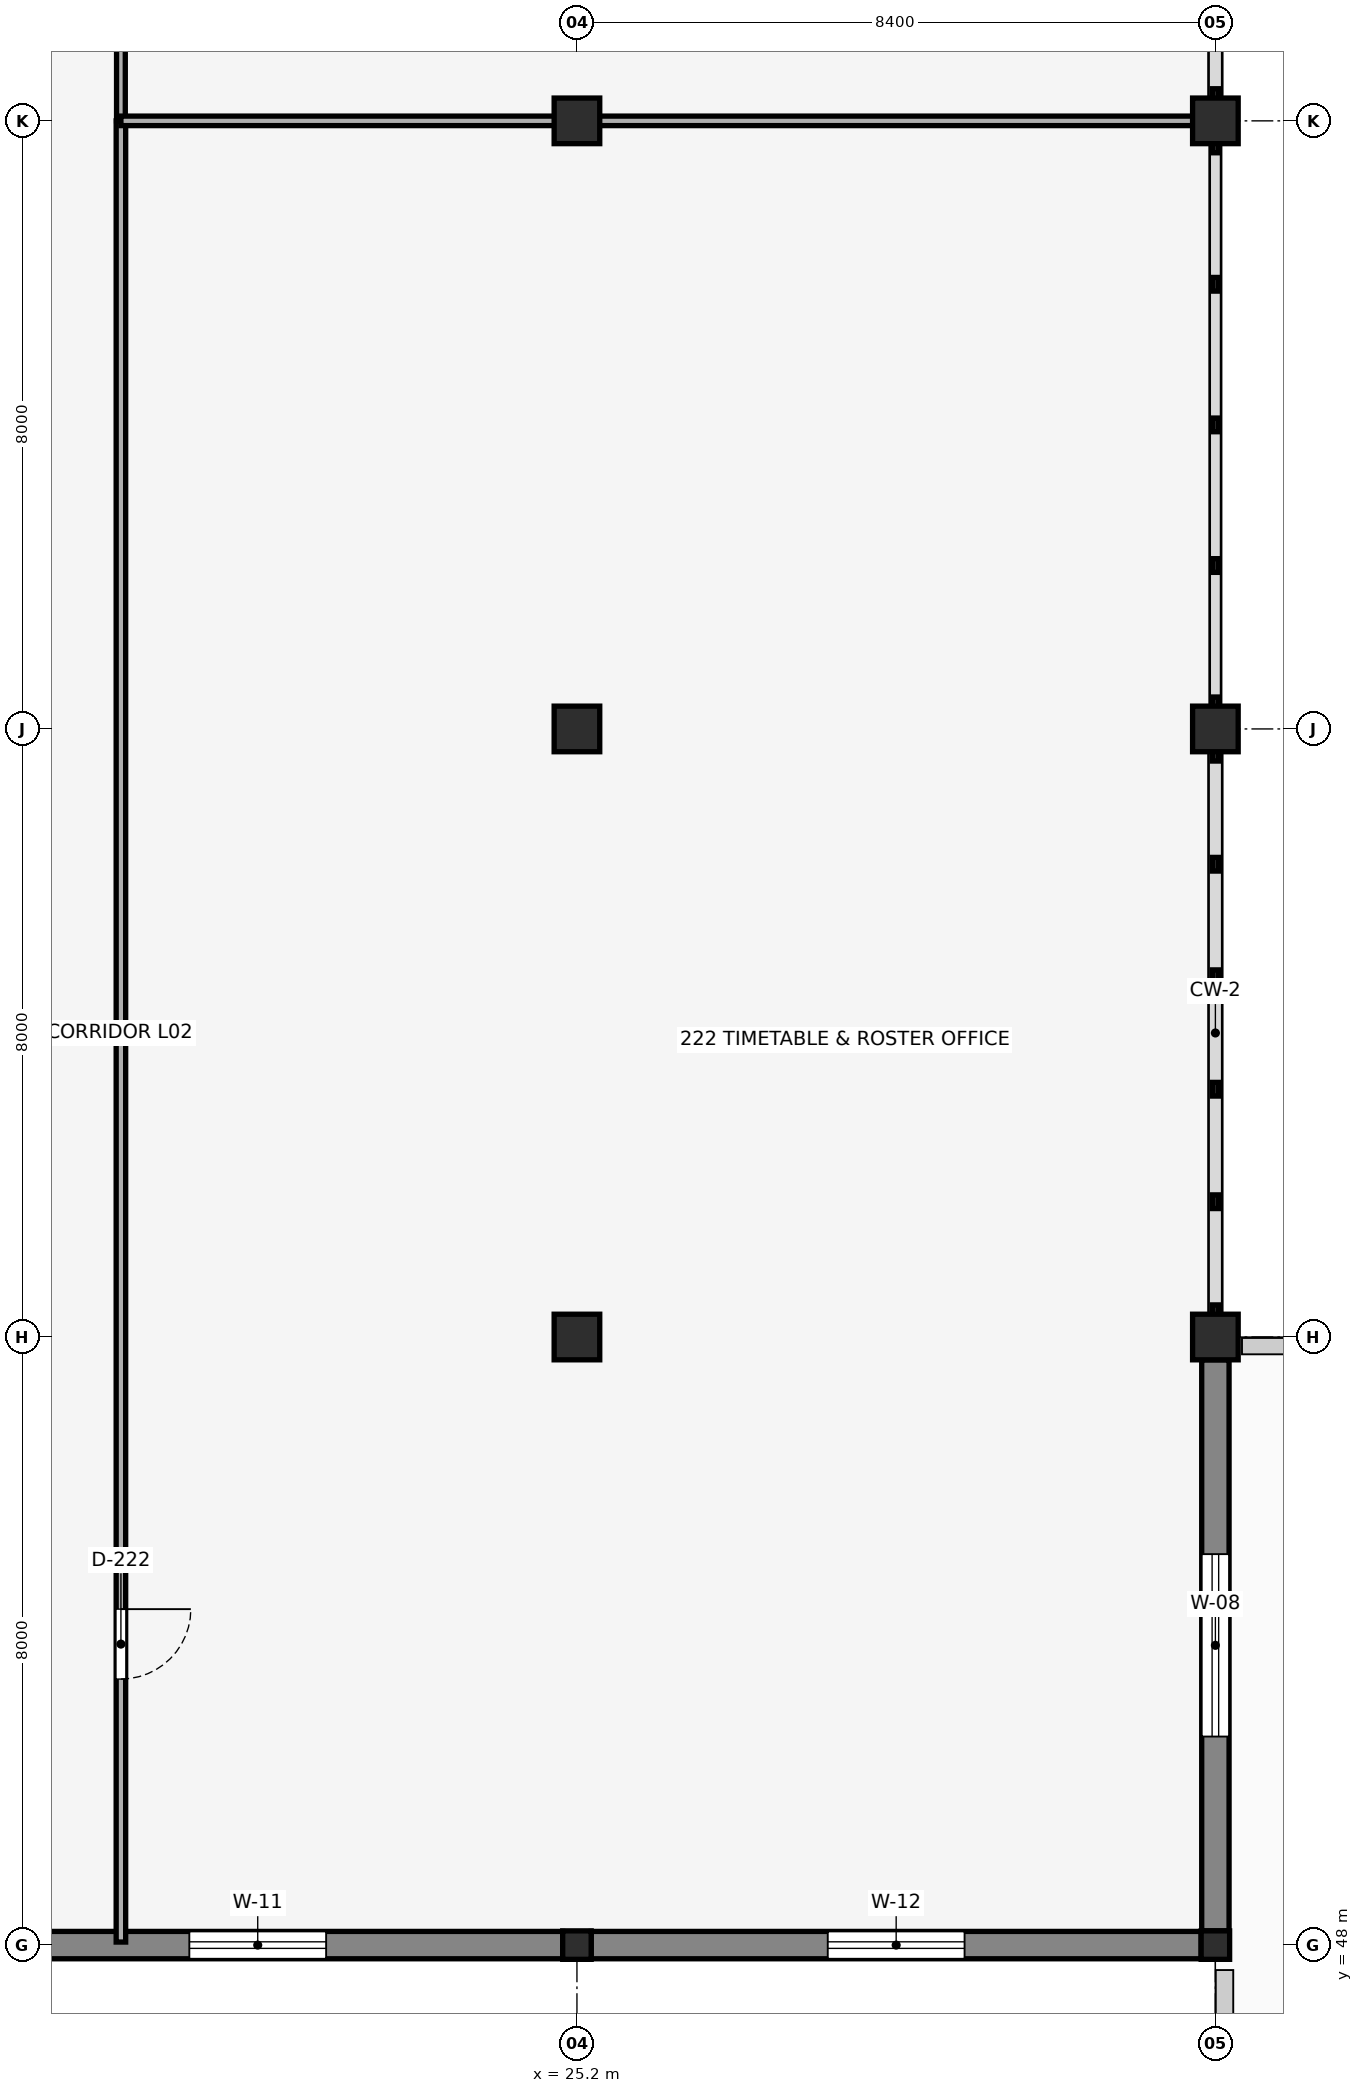
"""IFC4 building model, lengths in metres.
Left out: names, types, materials, properties, quantities, classifications, styles, units other than length and angle.
Written with IfcOpenShell. Run it as: python <this file> out.ifc"""

import sys

from ifc_helpers import new_model, si_unit, direction, frame, frame_2d, origin, origin_2d, place, context, subcontext, project, spatial, rectangle, i_section, extrude, element, fill, save


model = new_model("IFC4")
c1 = context("Model", 3, precision=1e-05, world=origin(), true_north=direction((0.0, 1.0)))
c2 = subcontext(c1, "Body", "Model", "MODEL_VIEW")
j1 = project(units=[si_unit("LENGTHUNIT", "METRE"), si_unit("PLANEANGLEUNIT", "RADIAN")], contexts=[c1])
p1 = place(None, origin())
s1 = spatial("IfcSite", under=j1, at=p1, CompositionType="ELEMENT")
p2 = place(p1, origin())
s2 = spatial("IfcBuilding", under=s1, at=p2, CompositionType="ELEMENT")
p3 = place(p2, frame((0.0, 0.0, 9.52)))
s3 = spatial("IfcBuildingStorey", under=s2, at=p3, CompositionType="ELEMENT", Elevation=9.52)
p4 = place(p3, frame((25.2, 48.0, 0.0), z_axis=(0.0, 0.0, 1.0), x_axis=(1.0, 0.0, 0.0)))
e1 = element("IfcColumn", 1, at=p4, inside=s3, PredefinedType="COLUMN", context=c2, shape_type="SweptSolid", body=[
    extrude(i_section(OverallWidth=0.375, OverallDepth=0.375, WebThickness=0.017, FlangeThickness=0.027, FilletRadius=0.015, at=origin_2d()), origin(), (0.0, 0.0, 1.0), 3.57),
])
for number, where, z_axis, x_axis in (
    (2, (25.2, 56.0, 0.0), (0.0, 0.0, 1.0), (1.0, 0.0, 0.0)),
    (3, (25.2, 64.0, 0.0), (0.0, 0.0, 1.0), (1.0, 0.0, 0.0)),
    (4, (25.2, 72.0, 0.0), (0.0, 0.0, 1.0), (1.0, 0.0, 0.0)),
):
    element("IfcColumn", number, at=place(p3, frame(where, z_axis=z_axis, x_axis=x_axis)), inside=s3, PredefinedType="COLUMN", context=c2, shape_type="SweptSolid", body=[
        extrude(rectangle(XDim=0.6, YDim=0.6, at=origin_2d()), origin(), (0.0, 0.0, 1.0), 3.57),
    ])
p5 = place(p3, frame((33.6, 48.0, 0.0), z_axis=(0.0, 0.0, 1.0), x_axis=(1.0, 0.0, 0.0)))
e5 = element("IfcColumn", 5, at=p5, inside=s3, PredefinedType="COLUMN", context=c2, shape_type="SweptSolid", body=[
    extrude(i_section(OverallWidth=0.375, OverallDepth=0.375, WebThickness=0.017, FlangeThickness=0.027, FilletRadius=0.015, at=origin_2d()), origin(), (0.0, 0.0, 1.0), 3.57),
])
for number, where, z_axis, x_axis in (
    (6, (33.6, 56.0, 0.0), (0.0, 0.0, 1.0), (1.0, 0.0, 0.0)),
    (7, (33.6, 64.0, 0.0), (0.0, 0.0, 1.0), (1.0, 0.0, 0.0)),
    (8, (33.6, 72.0, 0.0), (0.0, 0.0, 1.0), (1.0, 0.0, 0.0)),
):
    element("IfcColumn", number, at=place(p3, frame(where, z_axis=z_axis, x_axis=x_axis)), inside=s3, PredefinedType="COLUMN", context=c2, shape_type="SweptSolid", body=[
        extrude(rectangle(XDim=0.6, YDim=0.6, at=origin_2d()), origin(), (0.0, 0.0, 1.0), 3.57),
    ])
p6 = place(p3, frame((33.6, 48.187, 0.0), z_axis=(0.0, 0.0, 1.0), x_axis=(0.0, 1.0, 0.0)))
e9 = element("IfcWall", 9, at=p6, inside=s3, PredefinedType="SOLIDWALL", context=c2, shape_type="SweptSolid", body=[
    extrude(rectangle(XDim=7.513, YDim=0.36, at=frame_2d((3.756, 0.0))), origin(), (0.0, 0.0, 1.0), 3.219),
])
p7 = place(p6, frame((2.556, 0.0, 0.9), z_axis=(0.0, 0.0, 1.0), x_axis=(1.0, 0.0, 0.0)))
e10 = element("IfcOpeningElement", 10, at=p7, cuts=e9, PredefinedType="OPENING", context=c2, shape_type="SweptSolid", body=[
    extrude(rectangle(XDim=2.4, YDim=1.5, at=frame_2d((1.2, 0.75))), frame((0.0, 0.19, 0.0), z_axis=(0.0, -1.0, 0.0), x_axis=(1.0, 0.0, 0.0)), (0.0, 0.0, 1.0), 0.38),
])
p8 = place(p3, frame((16.987, 48.0, 0.0), z_axis=(0.0, 0.0, 1.0), x_axis=(1.0, 0.0, 0.0)))
e11 = element("IfcWall", 11, at=p8, inside=s3, PredefinedType="SOLIDWALL", context=c2, shape_type="SweptSolid", body=[
    extrude(rectangle(XDim=8.025, YDim=0.36, at=frame_2d((4.013, 0.0))), origin(), (0.0, 0.0, 1.0), 3.27),
])
p9 = place(p8, frame((3.113, 0.0, 0.9), z_axis=(0.0, 0.0, 1.0), x_axis=(1.0, 0.0, 0.0)))
e12 = element("IfcOpeningElement", 12, at=p9, cuts=e11, PredefinedType="OPENING", context=c2, shape_type="SweptSolid", body=[
    extrude(rectangle(XDim=1.8, YDim=1.45, at=frame_2d((0.9, 0.725))), frame((0.0, 0.19, 0.0), z_axis=(0.0, -1.0, 0.0), x_axis=(1.0, 0.0, 0.0)), (0.0, 0.0, 1.0), 0.38),
])
p10 = place(p3, frame((25.387, 48.0, 0.0), z_axis=(0.0, 0.0, 1.0), x_axis=(1.0, 0.0, 0.0)))
e13 = element("IfcWall", 13, at=p10, inside=s3, PredefinedType="SOLIDWALL", context=c2, shape_type="SweptSolid", body=[
    extrude(rectangle(XDim=8.025, YDim=0.36, at=frame_2d((4.013, 0.0))), origin(), (0.0, 0.0, 1.0), 3.27),
])
p11 = place(p10, frame((3.113, 0.0, 0.9), z_axis=(0.0, 0.0, 1.0), x_axis=(1.0, 0.0, 0.0)))
e14 = element("IfcOpeningElement", 14, at=p11, cuts=e13, PredefinedType="OPENING", context=c2, shape_type="SweptSolid", body=[
    extrude(rectangle(XDim=1.8, YDim=1.3, at=frame_2d((0.9, 0.65))), frame((0.0, 0.19, 0.0), z_axis=(0.0, -1.0, 0.0), x_axis=(1.0, 0.0, 0.0)), (0.0, 0.0, 1.0), 0.38),
])
p12 = place(p3, frame((33.72, 40.35, 0.0), z_axis=(0.0, 0.0, 1.0), x_axis=(0.0, 1.0, 0.0)))
e15 = element("IfcWall", 15, at=p12, inside=s3, PredefinedType="PARAPET", context=c2, shape_type="SweptSolid", body=[
    extrude(rectangle(XDim=7.322, YDim=0.23, at=frame_2d((3.661, 0.0))), origin(), (0.0, 0.0, 1.0), 1.05),
])
p13 = place(p3, frame((33.95, 55.88, 0.0), z_axis=(0.0, 0.0, 1.0), x_axis=(1.0, 0.0, 0.0)))
e16 = element("IfcWall", 16, at=p13, inside=s3, PredefinedType="PARAPET", context=c2, shape_type="SweptSolid", body=[
    extrude(rectangle(XDim=24.25, YDim=0.215, at=frame_2d((12.125, 0.0))), origin(), (0.0, 0.0, 1.0), 1.05),
])
p14 = place(p3, frame((19.2, 48.04, 0.0), z_axis=(0.0, 0.0, 1.0), x_axis=(0.0, 1.0, 0.0)))
e17 = element("IfcWall", 17, at=p14, inside=s3, PredefinedType="PARTITIONING", context=c2, shape_type="SweptSolid", body=[
    extrude(rectangle(XDim=23.96, YDim=0.125, at=frame_2d((11.98, 0.0))), origin(), (0.0, 0.0, 1.0), 3.57),
])
p15 = place(p14, frame((4.38, 0.0, 0.0), z_axis=(0.0, 0.0, 1.0), x_axis=(-1.0, 0.0, 0.0)))
e18 = element("IfcOpeningElement", 18, at=p15, cuts=e17, PredefinedType="OPENING", context=c2, shape_type="SweptSolid", body=[
    extrude(rectangle(XDim=0.92, YDim=2.12, at=frame_2d((0.46, 1.06))), frame((0.0, 0.073, 0.0), z_axis=(0.0, -1.0, 0.0), x_axis=(1.0, 0.0, 0.0)), (0.0, 0.0, 1.0), 0.145),
])
p16 = place(p3, frame((19.2, 72.0, 0.0), z_axis=(0.0, 0.0, 1.0), x_axis=(0.0, 1.0, 0.0)))
e19 = element("IfcWall", 19, at=p16, inside=s3, PredefinedType="PARTITIONING", context=c2, shape_type="SweptSolid", body=[
    extrude(rectangle(XDim=16.0, YDim=0.115, at=frame_2d((8.0, 0.0))), origin(), (0.0, 0.0, 1.0), 3.57),
])
p17 = place(p16, frame((4.4, 0.0, 0.0), z_axis=(0.0, 0.0, 1.0), x_axis=(-1.0, 0.0, 0.0)))
e20 = element("IfcOpeningElement", 20, at=p17, cuts=e19, PredefinedType="OPENING", context=c2, shape_type="SweptSolid", body=[
    extrude(rectangle(XDim=0.9, YDim=2.1, at=frame_2d((0.45, 1.05))), frame((0.0, 0.067, 0.0), z_axis=(0.0, -1.0, 0.0), x_axis=(1.0, 0.0, 0.0)), (0.0, 0.0, 1.0), 0.135),
])
p18 = place(p3, frame((19.2, 72.0, 0.0), z_axis=(0.0, 0.0, 1.0), x_axis=(1.0, 0.0, 0.0)))
e21 = element("IfcWall", 21, at=p18, inside=s3, PredefinedType="PARTITIONING", context=c2, shape_type="SweptSolid", body=[
    extrude(rectangle(XDim=5.71, YDim=0.125, at=frame_2d((2.855, 0.0))), origin(), (0.0, 0.0, 1.0), 3.037),
])
p19 = place(p3, frame((25.49, 72.0, 0.0), z_axis=(0.0, 0.0, 1.0), x_axis=(1.0, 0.0, 0.0)))
e22 = element("IfcWall", 22, at=p19, inside=s3, PredefinedType="PARTITIONING", context=c2, shape_type="SweptSolid", body=[
    extrude(rectangle(XDim=7.82, YDim=0.125, at=frame_2d((3.91, 0.0))), origin(), (0.0, 0.0, 1.0), 3.037),
])
p20 = place(p7, origin())
e23 = element("IfcWindow", 23, at=p20, inside=s3, PartitioningType="DOUBLE_PANEL_VERTICAL", PredefinedType="WINDOW", context=c2, shape_type="SweptSolid", body=[
    extrude(rectangle(XDim=2.4, YDim=1.5, at=frame_2d((1.2, 0.75))), frame((0.0, 0.03, 0.0), z_axis=(0.0, -1.0, 0.0), x_axis=(1.0, 0.0, 0.0)), (0.0, 0.0, 1.0), 0.06),
])
fill(e10, e23)
p21 = place(p9, origin())
e24 = element("IfcWindow", 24, at=p21, inside=s3, PartitioningType="DOUBLE_PANEL_VERTICAL", PredefinedType="WINDOW", context=c2, shape_type="SweptSolid", body=[
    extrude(rectangle(XDim=1.8, YDim=1.45, at=frame_2d((0.9, 0.725))), frame((0.0, 0.03, 0.0), z_axis=(0.0, -1.0, 0.0), x_axis=(1.0, 0.0, 0.0)), (0.0, 0.0, 1.0), 0.06),
])
fill(e12, e24)
p22 = place(p11, origin())
e25 = element("IfcWindow", 25, at=p22, inside=s3, PartitioningType="DOUBLE_PANEL_VERTICAL", PredefinedType="WINDOW", context=c2, shape_type="SweptSolid", body=[
    extrude(rectangle(XDim=1.8, YDim=1.3, at=frame_2d((0.9, 0.65))), frame((0.0, 0.03, 0.0), z_axis=(0.0, -1.0, 0.0), x_axis=(1.0, 0.0, 0.0)), (0.0, 0.0, 1.0), 0.06),
])
fill(e14, e25)
p23 = place(p15, origin())
e26 = element("IfcDoor", 26, at=p23, inside=s3, OperationType="SINGLE_SWING_LEFT", PredefinedType="DOOR", context=c2, shape_type="SweptSolid", body=[
    extrude(rectangle(XDim=0.92, YDim=2.12, at=frame_2d((0.46, 1.06))), frame((0.0, 0.025, 0.0), z_axis=(0.0, -1.0, 0.0), x_axis=(1.0, 0.0, 0.0)), (0.0, 0.0, 1.0), 0.05),
])
fill(e18, e26)
save(model, sys.argv[1])
